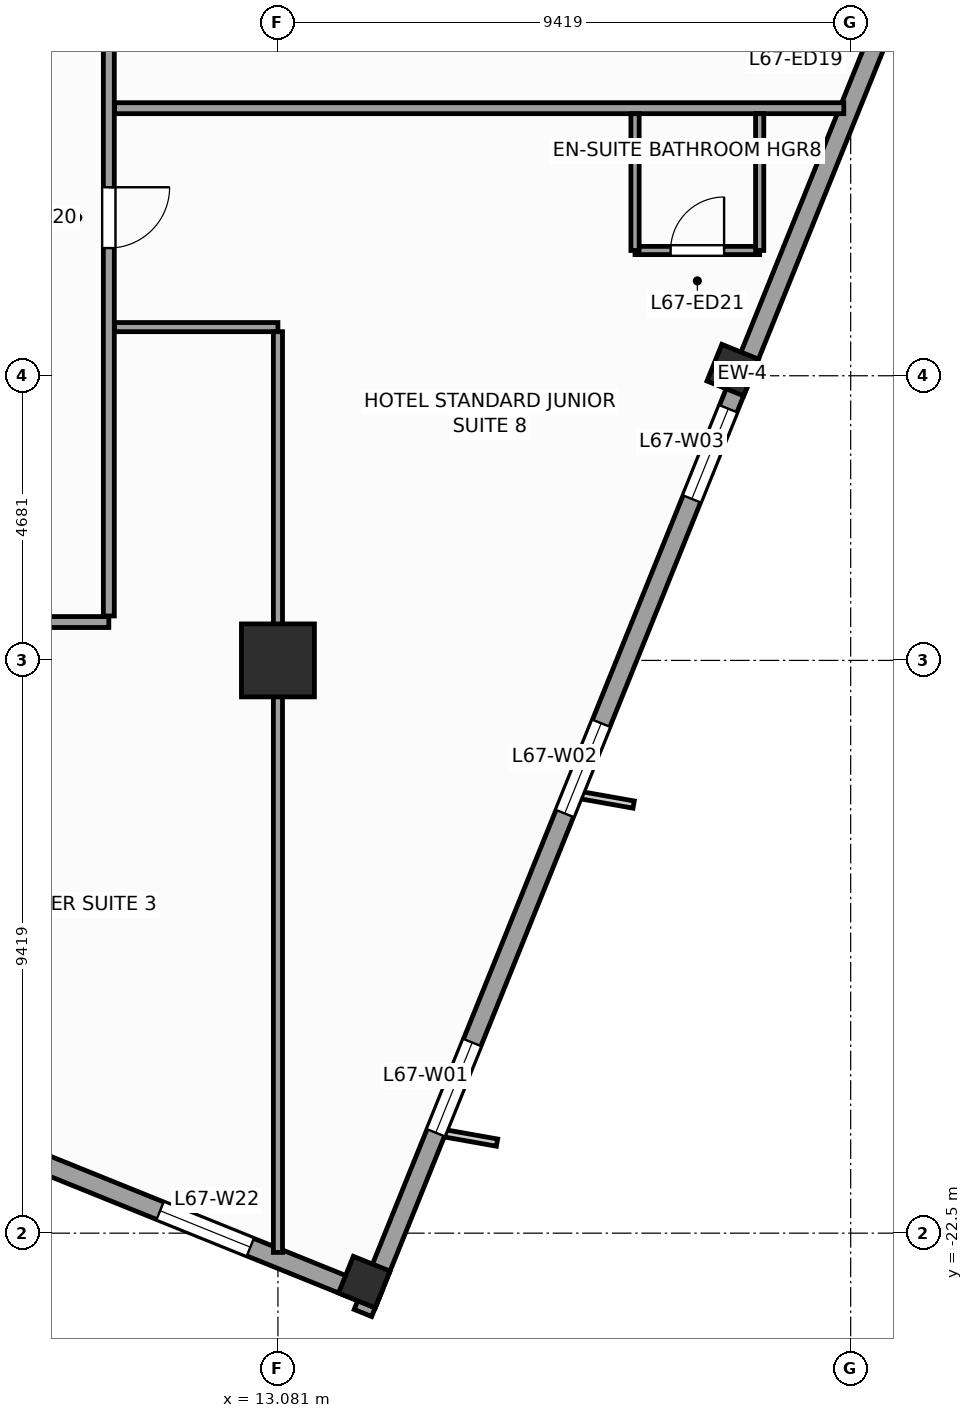
"""IFC4 building model, lengths in metres.
Left out: names, types, materials, properties, quantities, classifications, styles, units other than length and angle.
Written with IfcOpenShell. Run it as: python <this file> out.ifc"""

import sys

from ifc_helpers import new_model, si_unit, direction, frame, frame_2d, origin, origin_2d, place, context, subcontext, project, spatial, rectangle, extrude, source, transform, mapped, element, fill, save


model = new_model("IFC4")
c1 = context("Model", 3, precision=1e-05, world=origin(), true_north=direction((0.0, 1.0)))
c2 = subcontext(c1, "Body", "Model", "MODEL_VIEW")
j1 = project(units=[si_unit("LENGTHUNIT", "METRE"), si_unit("PLANEANGLEUNIT", "RADIAN")], contexts=[c1])
p1 = place(None, origin())
s1 = spatial("IfcSite", under=j1, at=p1, CompositionType="ELEMENT")
p2 = place(p1, origin())
s2 = spatial("IfcBuilding", under=s1, at=p2, CompositionType="ELEMENT")
p3 = place(p2, frame((0.0, 0.0, 276.0)))
s3 = spatial("IfcBuildingStorey", under=s2, at=p3, CompositionType="ELEMENT", Elevation=276.0)
m1 = source(origin(), c2, "Body", "SweptSolid", [
    extrude(rectangle(XDim=1.2, YDim=1.2, at=origin_2d()), origin(), (0.0, 0.0, 1.0), 3.6),
])
p4 = place(p3, frame((13.081, -13.081, 0.0), z_axis=(0.0, 0.0, 1.0), x_axis=(1.0, 0.0, 0.0)))
e1 = element("IfcColumn", 1, at=p4, inside=s3, PredefinedType="COLUMN", context=c2, shape_type="MappedRepresentation", body=[
    mapped(m1, transform((0.0, 0.0, 0.0), scale=1.0)),
])
m2 = source(origin(), c2, "Body", "SweptSolid", [
    extrude(rectangle(XDim=0.65, YDim=0.65, at=origin_2d()), origin(), (0.0, 0.0, 1.0), 3.6),
])
for number, where, z_axis, x_axis in (
    (2, (14.501, -23.304, 0.0), (0.0, 0.0, 1.0), (0.375, 0.927, 0.0)),
    (3, (20.56, -8.307, 0.0), (0.0, 0.0, 1.0), (0.375, 0.927, 0.0)),
):
    element("IfcColumn", number, at=place(p3, frame(where, z_axis=z_axis, x_axis=x_axis)), inside=s3, PredefinedType="COLUMN", context=c2, shape_type="MappedRepresentation", body=[
        mapped(m2, transform((0.0, 0.0, 0.0), scale=1.0)),
    ])
p5 = place(p3, frame((14.479, -23.813, 0.0), z_axis=(0.0, 0.0, 1.0), x_axis=(0.374609557019, 0.927182657188, 0.0)))
e4 = element("IfcWall", 4, at=p5, inside=s3, PredefinedType="STANDARD", context=c2, shape_type="SweptSolid", body=[
    extrude(rectangle(XDim=33.31, YDim=0.31, at=frame_2d((16.655, 0.0))), origin(), (0.0, 0.0, 1.0), 2.75),
])
p6 = place(p5, frame((3.197, 0.0, 0.47)))
e5 = element("IfcOpeningElement", 5, at=p6, cuts=e4, PredefinedType="OPENING", context=c2, shape_type="SweptSolid", body=[
    extrude(rectangle(XDim=1.6, YDim=2.1, at=frame_2d((0.8, 1.05))), frame((0.0, 0.165, 0.0), z_axis=(0.0, -1.0, 0.0), x_axis=(1.0, 0.0, 0.0)), (0.0, 0.0, 1.0), 0.33),
])
p7 = place(p5, frame((8.86, 0.0, 0.47)))
e6 = element("IfcOpeningElement", 6, at=p7, cuts=e4, PredefinedType="OPENING", context=c2, shape_type="SweptSolid", body=[
    extrude(rectangle(XDim=1.6, YDim=2.1, at=frame_2d((0.8, 1.05))), frame((0.0, 0.165, 0.0), z_axis=(0.0, -1.0, 0.0), x_axis=(1.0, 0.0, 0.0)), (0.0, 0.0, 1.0), 0.33),
])
p8 = place(p5, frame((14.439, 0.0, 0.47)))
e7 = element("IfcOpeningElement", 7, at=p8, cuts=e4, PredefinedType="OPENING", context=c2, shape_type="SweptSolid", body=[
    extrude(rectangle(XDim=1.6, YDim=2.1, at=frame_2d((0.8, 1.05))), frame((0.0, 0.165, 0.0), z_axis=(0.0, -1.0, 0.0), x_axis=(1.0, 0.0, 0.0)), (0.0, 0.0, 1.0), 0.33),
])
p9 = place(p5, frame((23.351, 0.0, 0.47)))
e8 = element("IfcOpeningElement", 8, at=p9, cuts=e4, PredefinedType="OPENING", context=c2, shape_type="SweptSolid", body=[
    extrude(rectangle(XDim=1.6, YDim=2.1, at=frame_2d((0.8, 1.05))), frame((0.0, 0.165, 0.0), z_axis=(0.0, -1.0, 0.0), x_axis=(1.0, 0.0, 0.0)), (0.0, 0.0, 1.0), 0.33),
])
p10 = place(p5, frame((27.847, 0.0, 0.47)))
e9 = element("IfcOpeningElement", 9, at=p10, cuts=e4, PredefinedType="OPENING", context=c2, shape_type="SweptSolid", body=[
    extrude(rectangle(XDim=1.6, YDim=2.1, at=frame_2d((0.8, 1.05))), frame((0.0, 0.165, 0.0), z_axis=(0.0, -1.0, 0.0), x_axis=(1.0, 0.0, 0.0)), (0.0, 0.0, 1.0), 0.33),
])
p11 = place(p3, frame((9.032, -21.278, 0.0), z_axis=(0.0, 0.0, 1.0), x_axis=(0.927185411764, -0.374602739196, 0.0)))
e10 = element("IfcWall", 10, at=p11, inside=s3, PredefinedType="STANDARD", context=c2, shape_type="SweptSolid", body=[
    extrude(rectangle(XDim=6.155, YDim=0.31, at=frame_2d((3.078, 0.0))), origin(), (0.0, 0.0, 1.0), 3.35),
])
p12 = place(p11, frame((2.278, 0.0, 0.47)))
e11 = element("IfcOpeningElement", 11, at=p12, cuts=e10, PredefinedType="OPENING", context=c2, shape_type="SweptSolid", body=[
    extrude(rectangle(XDim=1.6, YDim=2.1, at=frame_2d((0.8, 1.05))), frame((0.0, 0.165, 0.0), z_axis=(0.0, -1.0, 0.0), x_axis=(1.0, 0.0, 0.0)), (0.0, 0.0, 1.0), 0.33),
])
p13 = place(p3, frame((-11.45, -12.45, 0.0), z_axis=(0.0, 0.0, 1.0), x_axis=(1.0, 0.0, 0.0)))
e12 = element("IfcWall", 12, at=p13, inside=s3, PredefinedType="PARTITIONING", context=c2, shape_type="SweptSolid", body=[
    extrude(rectangle(XDim=21.75, YDim=0.18, at=frame_2d((10.875, 0.0))), origin(), (0.0, 0.0, 1.0), 3.35),
])
p14 = place(p13, frame((12.436, 0.0, 0.0)))
e13 = element("IfcOpeningElement", 13, at=p14, cuts=e12, PredefinedType="OPENING", context=c2, shape_type="SweptSolid", body=[
    extrude(rectangle(XDim=0.95, YDim=2.1, at=frame_2d((0.475, 1.05))), frame((0.0, 0.1, 0.0), z_axis=(0.0, -1.0, 0.0), x_axis=(1.0, 0.0, 0.0)), (0.0, 0.0, 1.0), 0.2),
])
p15 = place(p13, frame((18.186, 0.0, 0.0)))
e14 = element("IfcOpeningElement", 14, at=p15, cuts=e12, PredefinedType="OPENING", context=c2, shape_type="SweptSolid", body=[
    extrude(rectangle(XDim=1.0, YDim=2.15, at=frame_2d((0.5, 1.075))), frame((0.0, 0.1, 0.0), z_axis=(0.0, -1.0, 0.0), x_axis=(1.0, 0.0, 0.0)), (0.0, 0.0, 1.0), 0.2),
])
p16 = place(p13, frame((14.5, 0.0, 0.0)))
e15 = element("IfcOpeningElement", 15, at=p16, cuts=e12, PredefinedType="OPENING", context=c2, shape_type="SweptSolid", body=[
    extrude(rectangle(XDim=1.0, YDim=2.15, at=frame_2d((0.5, 1.075))), frame((0.0, 0.1, 0.0), z_axis=(0.0, -1.0, 0.0), x_axis=(1.0, 0.0, 0.0)), (0.0, 0.0, 1.0), 0.2),
])
p17 = place(p13, frame((8.7, 0.0, 0.0)))
e16 = element("IfcOpeningElement", 16, at=p17, cuts=e12, PredefinedType="OPENING", context=c2, shape_type="SweptSolid", body=[
    extrude(rectangle(XDim=1.0, YDim=2.15, at=frame_2d((0.5, 1.075))), frame((0.0, 0.1, 0.0), z_axis=(0.0, -1.0, 0.0), x_axis=(1.0, 0.0, 0.0)), (0.0, 0.0, 1.0), 0.2),
])
p18 = place(p13, frame((3.139, 0.0, 0.0)))
e17 = element("IfcOpeningElement", 17, at=p18, cuts=e12, PredefinedType="OPENING", context=c2, shape_type="SweptSolid", body=[
    extrude(rectangle(XDim=1.0, YDim=2.15, at=frame_2d((0.5, 1.075))), frame((0.0, 0.1, 0.0), z_axis=(0.0, -1.0, 0.0), x_axis=(1.0, 0.0, 0.0)), (0.0, 0.0, 1.0), 0.2),
])
p19 = place(p3, frame((10.3, -12.35, 0.0), z_axis=(0.0, 0.0, 1.0), x_axis=(0.0, 1.0, 0.0)))
e18 = element("IfcWall", 18, at=p19, inside=s3, PredefinedType="PARTITIONING", context=c2, shape_type="SweptSolid", body=[
    extrude(rectangle(XDim=23.7, YDim=0.18, at=frame_2d((11.85, 0.0))), origin(), (0.0, 0.0, 1.0), 3.35),
])
p20 = place(p19, frame((17.65, 0.0, 0.0)))
e19 = element("IfcOpeningElement", 19, at=p20, cuts=e18, PredefinedType="OPENING", context=c2, shape_type="SweptSolid", body=[
    extrude(rectangle(XDim=1.0, YDim=2.15, at=frame_2d((0.5, 1.075))), frame((0.0, 0.1, 0.0), z_axis=(0.0, -1.0, 0.0), x_axis=(1.0, 0.0, 0.0)), (0.0, 0.0, 1.0), 0.2),
])
p21 = place(p19, frame((13.85, 0.0, 0.0)))
e20 = element("IfcOpeningElement", 20, at=p21, cuts=e18, PredefinedType="OPENING", context=c2, shape_type="SweptSolid", body=[
    extrude(rectangle(XDim=1.0, YDim=2.15, at=frame_2d((0.5, 1.075))), frame((0.0, 0.1, 0.0), z_axis=(0.0, -1.0, 0.0), x_axis=(1.0, 0.0, 0.0)), (0.0, 0.0, 1.0), 0.2),
])
p22 = place(p19, frame((9.85, 0.0, 0.0)))
e21 = element("IfcOpeningElement", 21, at=p22, cuts=e18, PredefinedType="OPENING", context=c2, shape_type="SweptSolid", body=[
    extrude(rectangle(XDim=1.0, YDim=2.15, at=frame_2d((0.5, 1.075))), frame((0.0, 0.1, 0.0), z_axis=(0.0, -1.0, 0.0), x_axis=(1.0, 0.0, 0.0)), (0.0, 0.0, 1.0), 0.2),
])
p23 = place(p19, frame((6.05, 0.0, 0.0)))
e22 = element("IfcOpeningElement", 22, at=p23, cuts=e18, PredefinedType="OPENING", context=c2, shape_type="SweptSolid", body=[
    extrude(rectangle(XDim=1.0, YDim=2.15, at=frame_2d((0.5, 1.075))), frame((0.0, 0.1, 0.0), z_axis=(0.0, -1.0, 0.0), x_axis=(1.0, 0.0, 0.0)), (0.0, 0.0, 1.0), 0.2),
])
p24 = place(p3, frame((10.395, -4.0, 0.0), z_axis=(0.0, 0.0, 1.0), x_axis=(1.0, 0.0, 0.0)))
e23 = element("IfcWall", 23, at=p24, inside=s3, PredefinedType="PARTITIONING", context=c2, shape_type="SweptSolid", body=[
    extrude(rectangle(XDim=11.992, YDim=0.18, at=frame_2d((5.996, 0.0))), origin(), (0.0, 0.0, 1.0), 3.02),
])
p25 = place(p3, frame((10.395, -7.6, 0.0), z_axis=(0.0, 0.0, 1.0), x_axis=(1.0, 0.0, 0.0)))
e24 = element("IfcWall", 24, at=p25, inside=s3, PredefinedType="PARTITIONING", context=c2, shape_type="SweptSolid", body=[
    extrude(rectangle(XDim=2.686, YDim=0.15, at=frame_2d((1.343, 0.0))), origin(), (0.0, 0.0, 1.0), 3.35),
])
p26 = place(p3, frame((13.081, -7.675, 0.0), z_axis=(0.0, 0.0, 1.0), x_axis=(0.0, -1.0, 0.0)))
e25 = element("IfcWall", 25, at=p26, inside=s3, PredefinedType="PARTITIONING", context=c2, shape_type="SweptSolid", body=[
    extrude(rectangle(XDim=15.142, YDim=0.15, at=frame_2d((7.571, 0.0))), origin(), (0.0, 0.0, 1.0), 2.45),
])
p27 = place(p3, frame((18.953, -6.34, 0.0), z_axis=(0.0, 0.0, 1.0), x_axis=(1.0, 0.0, 0.0)))
e26 = element("IfcWall", 26, at=p27, inside=s3, PredefinedType="PARTITIONING", context=c2, shape_type="SweptSolid", body=[
    extrude(rectangle(XDim=2.05, YDim=0.135, at=frame_2d((1.025, 0.0))), origin(), (0.0, 0.0, 1.0), 3.35),
])
p28 = place(p27, frame((0.585, 0.0, 0.0)))
e27 = element("IfcOpeningElement", 27, at=p28, cuts=e26, PredefinedType="OPENING", context=c2, shape_type="SweptSolid", body=[
    extrude(rectangle(XDim=0.88, YDim=2.1, at=frame_2d((0.44, 1.05))), frame((0.0, 0.078, 0.0), z_axis=(0.0, -1.0, 0.0), x_axis=(1.0, 0.0, 0.0)), (0.0, 0.0, 1.0), 0.155),
])
for number, where, z_axis, x_axis in (
    (28, (21.003, -6.34, 0.0), (0.0, 0.0, 1.0), (0.0, 1.0, 0.0)),
    (29, (18.953, -6.34, 0.0), (0.0, 0.0, 1.0), (0.0, 1.0, 0.0)),
):
    element("IfcWall", number, at=place(p3, frame(where, z_axis=z_axis, x_axis=x_axis)), inside=s3, PredefinedType="PARTITIONING", context=c2, shape_type="SweptSolid", body=[
        extrude(rectangle(XDim=2.25, YDim=0.135, at=frame_2d((1.125, 0.0))), origin(), (0.0, 0.0, 1.0), 3.35),
    ])
m3 = source(origin(), c2, "Body", "SweptSolid", [
    extrude(rectangle(XDim=1.6, YDim=2.1, at=frame_2d((0.8, 1.05))), frame((0.0, 0.03, 0.0), z_axis=(0.0, -1.0, 0.0), x_axis=(1.0, 0.0, 0.0)), (0.0, 0.0, 1.0), 0.06),
])
p29 = place(p6, origin())
e30 = element("IfcWindow", 30, at=p29, inside=s3, PartitioningType="SINGLE_PANEL", PredefinedType="WINDOW", context=c2, shape_type="MappedRepresentation", body=[
    mapped(m3, transform((0.0, 0.0, 0.0), scale=1.0)),
])
fill(e5, e30)
p30 = place(p7, origin())
e31 = element("IfcWindow", 31, at=p30, inside=s3, PartitioningType="SINGLE_PANEL", PredefinedType="WINDOW", context=c2, shape_type="MappedRepresentation", body=[
    mapped(m3, transform((0.0, 0.0, 0.0), scale=1.0)),
])
fill(e6, e31)
p31 = place(p8, origin())
e32 = element("IfcWindow", 32, at=p31, inside=s3, PartitioningType="SINGLE_PANEL", PredefinedType="WINDOW", context=c2, shape_type="MappedRepresentation", body=[
    mapped(m3, transform((0.0, 0.0, 0.0), scale=1.0)),
])
fill(e7, e32)
p32 = place(p12, origin())
e33 = element("IfcWindow", 33, at=p32, inside=s3, PartitioningType="SINGLE_PANEL", PredefinedType="WINDOW", context=c2, shape_type="MappedRepresentation", body=[
    mapped(m3, transform((0.0, 0.0, 0.0), scale=1.0)),
])
fill(e11, e33)
m4 = source(origin(), c2, "Body", "SweptSolid", [
    extrude(rectangle(XDim=1.0, YDim=2.15, at=frame_2d((0.5, 1.075))), frame((0.0, 0.025, 0.0), z_axis=(0.0, -1.0, 0.0), x_axis=(1.0, 0.0, 0.0)), (0.0, 0.0, 1.0), 0.05),
])
p33 = place(p23, frame((1.0, 0.0, 0.0), z_axis=(0.0, 0.0, 1.0), x_axis=(-1.0, 0.0, 0.0)))
e34 = element("IfcDoor", 34, at=p33, inside=s3, OperationType="SINGLE_SWING_RIGHT", PredefinedType="DOOR", context=c2, shape_type="MappedRepresentation", body=[
    mapped(m4, transform((0.0, 0.0, 0.0), scale=1.0)),
])
fill(e22, e34)
m5 = source(origin(), c2, "Body", "SweptSolid", [
    extrude(rectangle(XDim=0.88, YDim=2.1, at=frame_2d((0.44, 1.05))), frame((0.0, 0.025, 0.0), z_axis=(0.0, -1.0, 0.0), x_axis=(1.0, 0.0, 0.0)), (0.0, 0.0, 1.0), 0.05),
])
p34 = place(p28, origin())
e35 = element("IfcDoor", 35, at=p34, inside=s3, OperationType="SINGLE_SWING_RIGHT", PredefinedType="DOOR", context=c2, shape_type="MappedRepresentation", body=[
    mapped(m5, transform((0.0, 0.0, 0.0), scale=1.0)),
])
fill(e27, e35)
save(model, sys.argv[1])
